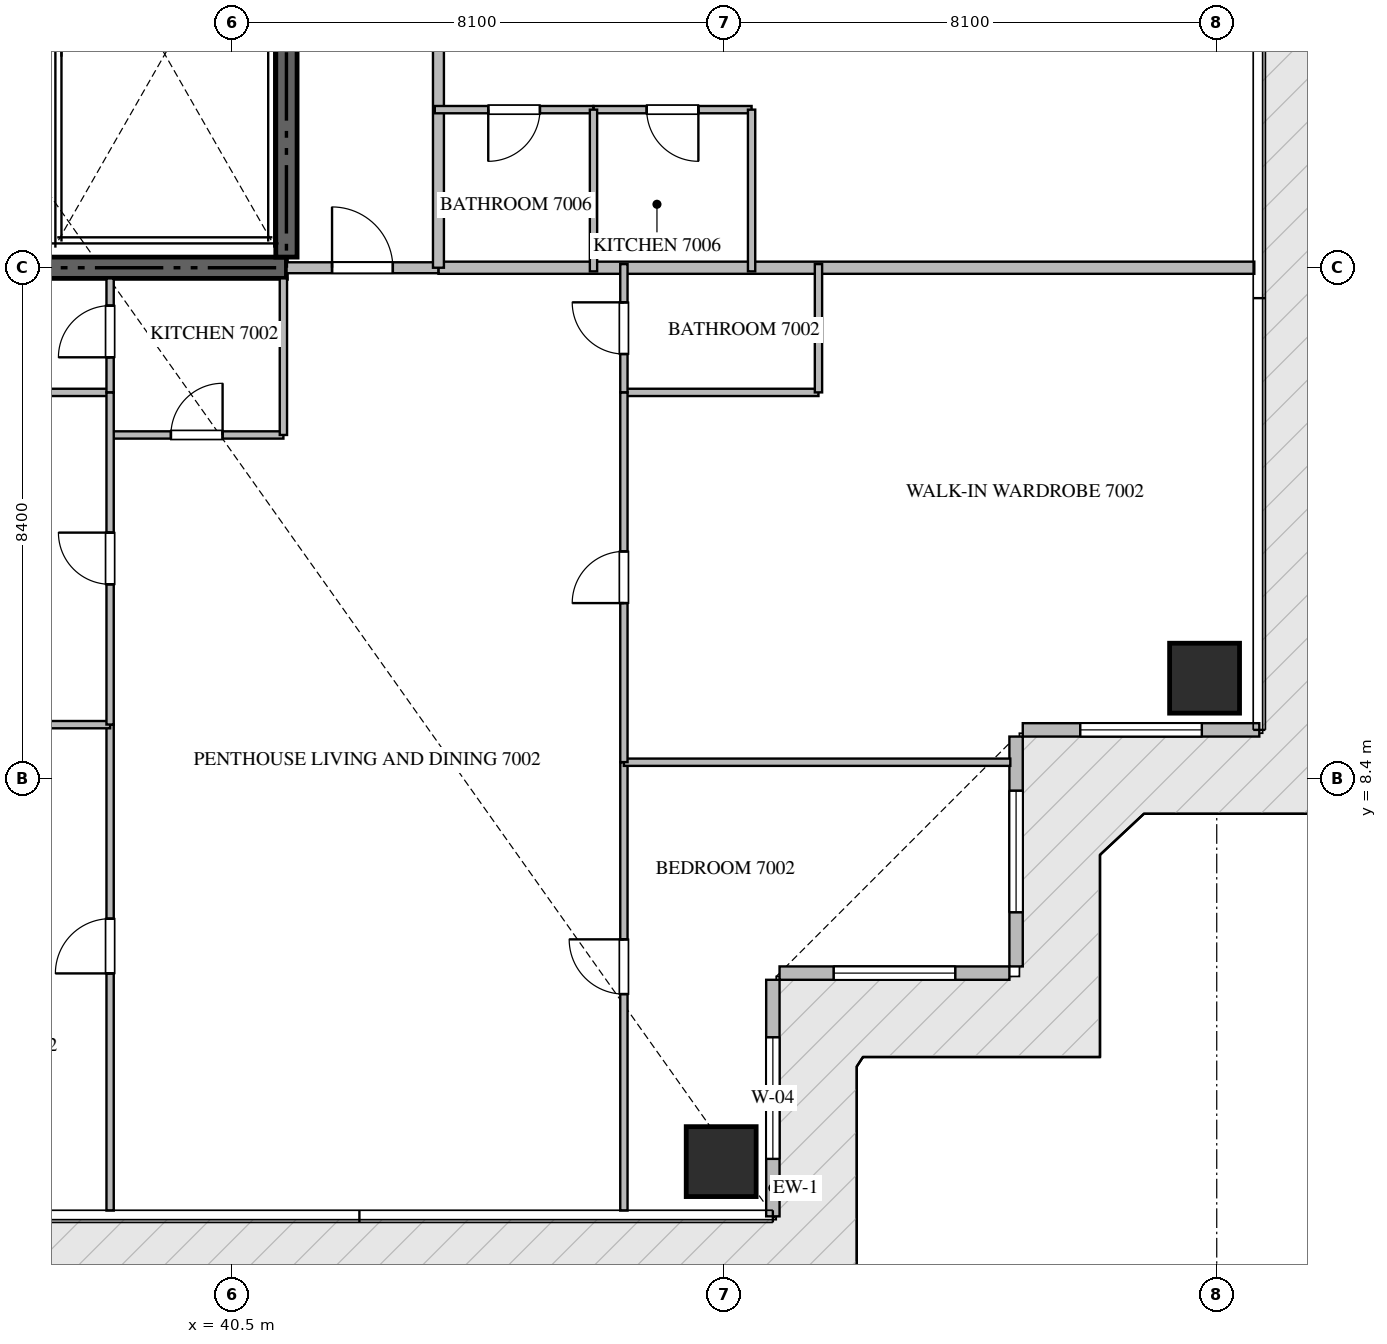
"""IFC4 building model, lengths in metres.
Left out: names, types, materials, properties, quantities, classifications, styles, units other than length and angle.
Written with IfcOpenShell. Run it as: python <this file> out.ifc"""

import sys

from ifc_helpers import new_model, si_unit, direction, frame, frame_2d, origin, origin_2d, place, context, subcontext, project, spatial, rectangle, extrude, source, transform, mapped, element, fill, save


model = new_model("IFC4")
c1 = context("Model", 3, precision=1e-05, world=origin(), true_north=direction((0.0, 1.0)))
c2 = subcontext(c1, "Body", "Model", "MODEL_VIEW")
j1 = project(units=[si_unit("LENGTHUNIT", "METRE"), si_unit("PLANEANGLEUNIT", "RADIAN")], contexts=[c1])
p1 = place(None, origin())
s1 = spatial("IfcSite", under=j1, at=p1, CompositionType="ELEMENT")
p2 = place(p1, origin())
s2 = spatial("IfcBuilding", under=s1, at=p2, CompositionType="ELEMENT")
p3 = place(p2, frame((0.0, 0.0, 279.75)))
s3 = spatial("IfcBuildingStorey", under=s2, at=p3, CompositionType="ELEMENT", Elevation=279.75)
p4 = place(p3, frame((23.4, 16.8, -0.26), z_axis=(0.0, 0.0, 1.0), x_axis=(1.0, 0.0, 0.0)))
e1 = element("IfcWall", 1, at=p4, inside=s3, PredefinedType="SHEAR", context=c2, shape_type="SweptSolid", body=[
    extrude(rectangle(XDim=18.0, YDim=0.35, at=frame_2d((9.0, 0.0))), origin(), (0.0, 0.0, 1.0), 3.848),
])
p5 = place(p3, frame((41.4, 16.975, -0.26), z_axis=(0.0, 0.0, 1.0), x_axis=(0.0, 1.0, 0.0)))
e2 = element("IfcWall", 2, at=p5, inside=s3, PredefinedType="SHEAR", context=c2, shape_type="SweptSolid", body=[
    extrude(rectangle(XDim=8.375, YDim=0.35, at=frame_2d((4.188, 0.0))), origin(), (0.0, 0.0, 1.0), 3.848),
])
m1 = source(origin(), c2, "Body", "SweptSolid", [
    extrude(rectangle(XDim=1.15, YDim=1.15, at=origin_2d()), origin(), (0.0, 0.0, 1.0), 3.85),
])
for number, where, z_axis, x_axis in (
    (3, (48.55, 2.1, -0.26), (0.0, 0.0, 1.0), (1.0, 0.0, 0.0)),
    (4, (56.5, 10.05, -0.26), (0.0, 0.0, 1.0), (1.0, 0.0, 0.0)),
):
    element("IfcColumn", number, at=place(p3, frame(where, z_axis=z_axis, x_axis=x_axis)), inside=s3, PredefinedType="COLUMN", context=c2, shape_type="MappedRepresentation", body=[
        mapped(m1, transform((0.0, 0.0, 0.0), scale=1.0)),
    ])
p6 = place(p3, frame((49.4, 1.2, 0.0), z_axis=(0.0, 0.0, 1.0), x_axis=(0.0, 1.0, 0.0)))
e5 = element("IfcWall", 5, at=p6, inside=s3, PredefinedType="ELEMENTEDWALL", context=c2, shape_type="SweptSolid", body=[
    extrude(rectangle(XDim=3.89, YDim=0.22, at=frame_2d((1.945, 0.0))), origin(), (0.0, 0.0, 1.0), 3.575),
])
p7 = place(p6, frame((0.945, 0.0, 0.65)))
e6 = element("IfcOpeningElement", 6, at=p7, cuts=e5, PredefinedType="OPENING", context=c2, shape_type="SweptSolid", body=[
    extrude(rectangle(XDim=2.0, YDim=2.2, at=frame_2d((1.0, 1.1))), frame((0.0, 0.12, 0.0), z_axis=(0.0, -1.0, 0.0), x_axis=(1.0, 0.0, 0.0)), (0.0, 0.0, 1.0), 0.24),
])
p8 = place(p3, frame((49.51, 5.2, 0.0), z_axis=(0.0, 0.0, 1.0), x_axis=(1.0, 0.0, 0.0)))
e7 = element("IfcWall", 7, at=p8, inside=s3, PredefinedType="ELEMENTEDWALL", context=c2, shape_type="SweptSolid", body=[
    extrude(rectangle(XDim=3.78, YDim=0.22, at=frame_2d((1.89, 0.0))), origin(), (0.0, 0.0, 1.0), 3.575),
])
p9 = place(p8, frame((0.89, 0.0, 0.65)))
e8 = element("IfcOpeningElement", 8, at=p9, cuts=e7, PredefinedType="OPENING", context=c2, shape_type="SweptSolid", body=[
    extrude(rectangle(XDim=2.0, YDim=2.2, at=frame_2d((1.0, 1.1))), frame((0.0, 0.12, 0.0), z_axis=(0.0, -1.0, 0.0), x_axis=(1.0, 0.0, 0.0)), (0.0, 0.0, 1.0), 0.24),
])
p10 = place(p3, frame((53.4, 5.31, 0.0), z_axis=(0.0, 0.0, 1.0), x_axis=(0.0, 1.0, 0.0)))
e9 = element("IfcWall", 9, at=p10, inside=s3, PredefinedType="ELEMENTEDWALL", context=c2, shape_type="SweptSolid", body=[
    extrude(rectangle(XDim=3.78, YDim=0.22, at=frame_2d((1.89, 0.0))), origin(), (0.0, 0.0, 1.0), 3.575),
])
p11 = place(p10, frame((0.89, 0.0, 0.65)))
e10 = element("IfcOpeningElement", 10, at=p11, cuts=e9, PredefinedType="OPENING", context=c2, shape_type="SweptSolid", body=[
    extrude(rectangle(XDim=2.0, YDim=2.2, at=frame_2d((1.0, 1.1))), frame((0.0, 0.12, 0.0), z_axis=(0.0, -1.0, 0.0), x_axis=(1.0, 0.0, 0.0)), (0.0, 0.0, 1.0), 0.24),
])
p12 = place(p3, frame((53.51, 9.2, 0.0), z_axis=(0.0, 0.0, 1.0), x_axis=(1.0, 0.0, 0.0)))
e11 = element("IfcWall", 11, at=p12, inside=s3, PredefinedType="ELEMENTEDWALL", context=c2, shape_type="SweptSolid", body=[
    extrude(rectangle(XDim=3.89, YDim=0.22, at=frame_2d((1.945, 0.0))), origin(), (0.0, 0.0, 1.0), 3.575),
])
p13 = place(p12, frame((0.945, 0.0, 0.65)))
e12 = element("IfcOpeningElement", 12, at=p13, cuts=e11, PredefinedType="OPENING", context=c2, shape_type="SweptSolid", body=[
    extrude(rectangle(XDim=2.0, YDim=2.2, at=frame_2d((1.0, 1.1))), frame((0.0, 0.12, 0.0), z_axis=(0.0, -1.0, 0.0), x_axis=(1.0, 0.0, 0.0)), (0.0, 0.0, 1.0), 0.24),
])
p14 = place(p3, frame((43.9, 16.8, 0.0), z_axis=(0.0, 0.0, 1.0), x_axis=(1.0, 0.0, 0.0)))
e13 = element("IfcWall", 13, at=p14, inside=s3, PredefinedType="PARTITIONING", context=c2, shape_type="SweptSolid", body=[
    extrude(rectangle(XDim=13.418, YDim=0.2, at=frame_2d((6.709, 0.0))), origin(), (0.0, 0.0, 1.0), 3.59),
])
p15 = place(p3, frame((41.402, 16.8, 0.0), z_axis=(0.0, 0.0, 1.0), x_axis=(1.0, 0.0, 0.0)))
e14 = element("IfcWall", 14, at=p15, inside=s3, PredefinedType="PARTITIONING", context=c2, shape_type="SweptSolid", body=[
    extrude(rectangle(XDim=2.496, YDim=0.18, at=frame_2d((1.248, 0.0))), origin(), (0.0, 0.0, 1.0), 3.59),
])
p16 = place(p15, frame((0.748, 0.0, 0.0)))
e15 = element("IfcOpeningElement", 15, at=p16, cuts=e14, PredefinedType="OPENING", context=c2, shape_type="SweptSolid", body=[
    extrude(rectangle(XDim=1.0, YDim=2.15, at=frame_2d((0.5, 1.075))), frame((0.0, 0.1, 0.0), z_axis=(0.0, -1.0, 0.0), x_axis=(1.0, 0.0, 0.0)), (0.0, 0.0, 1.0), 0.2),
])
p17 = place(p3, frame((43.9, 16.8, 0.0), z_axis=(0.0, 0.0, 1.0), x_axis=(0.0, 1.0, 0.0)))
e16 = element("IfcWall", 16, at=p17, inside=s3, PredefinedType="PARTITIONING", context=c2, shape_type="SweptSolid", body=[
    extrude(rectangle(XDim=16.8, YDim=0.18, at=frame_2d((8.4, 0.0))), origin(), (0.0, 0.0, 1.0), 3.59),
])
p18 = place(p17, frame((4.898, 0.0, 0.0)))
e17 = element("IfcOpeningElement", 17, at=p18, cuts=e16, PredefinedType="OPENING", context=c2, shape_type="SweptSolid", body=[
    extrude(rectangle(XDim=1.0, YDim=2.15, at=frame_2d((0.5, 1.075))), frame((0.0, 0.1, 0.0), z_axis=(0.0, -1.0, 0.0), x_axis=(1.0, 0.0, 0.0)), (0.0, 0.0, 1.0), 0.2),
])
p19 = place(p17, frame((13.335, 0.0, 0.0)))
e18 = element("IfcOpeningElement", 18, at=p19, cuts=e16, PredefinedType="OPENING", context=c2, shape_type="SweptSolid", body=[
    extrude(rectangle(XDim=1.0, YDim=2.15, at=frame_2d((0.5, 1.075))), frame((0.0, 0.1, 0.0), z_axis=(0.0, -1.0, 0.0), x_axis=(1.0, 0.0, 0.0)), (0.0, 0.0, 1.0), 0.2),
])
p20 = place(p3, frame((38.5, 14.05, 0.0), z_axis=(0.0, 0.0, 1.0), x_axis=(1.0, 0.0, 0.0)))
e19 = element("IfcWall", 19, at=p20, inside=s3, PredefinedType="PARTITIONING", context=c2, shape_type="SweptSolid", body=[
    extrude(rectangle(XDim=2.85, YDim=0.12, at=frame_2d((1.425, 0.0))), origin(), (0.0, 0.0, 1.0), 3.59),
])
p21 = place(p20, frame((1.0, 0.0, 0.0)))
e20 = element("IfcOpeningElement", 20, at=p21, cuts=e19, PredefinedType="OPENING", context=c2, shape_type="SweptSolid", body=[
    extrude(rectangle(XDim=0.85, YDim=2.1, at=frame_2d((0.425, 1.05))), frame((0.0, 0.07, 0.0), z_axis=(0.0, -1.0, 0.0), x_axis=(1.0, 0.0, 0.0)), (0.0, 0.0, 1.0), 0.14),
])
p22 = place(p3, frame((41.35, 14.05, 0.0), z_axis=(0.0, 0.0, 1.0), x_axis=(0.0, 1.0, 0.0)))
e21 = element("IfcWall", 21, at=p22, inside=s3, PredefinedType="PARTITIONING", context=c2, shape_type="SweptSolid", body=[
    extrude(rectangle(XDim=2.575, YDim=0.12, at=frame_2d((1.288, 0.0))), origin(), (0.0, 0.0, 1.0), 3.59),
])
p23 = place(p3, frame((38.5, 1.295, 0.0), z_axis=(0.0, 0.0, 1.0), x_axis=(0.0, 1.0, 0.0)))
e22 = element("IfcWall", 22, at=p23, inside=s3, PredefinedType="PARTITIONING", context=c2, shape_type="SweptSolid", body=[
    extrude(rectangle(XDim=7.991, YDim=0.12, at=frame_2d((3.996, 0.0))), origin(), (0.0, 0.0, 1.0), 3.59),
])
p24 = place(p23, frame((3.9, 0.0, 0.0)))
e23 = element("IfcOpeningElement", 23, at=p24, cuts=e22, PredefinedType="OPENING", context=c2, shape_type="SweptSolid", body=[
    extrude(rectangle(XDim=0.9, YDim=2.1, at=frame_2d((0.45, 1.05))), frame((0.0, 0.07, 0.0), z_axis=(0.0, -1.0, 0.0), x_axis=(1.0, 0.0, 0.0)), (0.0, 0.0, 1.0), 0.14),
])
p25 = place(p3, frame((33.14, 9.286, 0.0), z_axis=(0.0, 0.0, 1.0), x_axis=(1.0, 0.0, 0.0)))
e24 = element("IfcWall", 24, at=p25, inside=s3, PredefinedType="PARTITIONING", context=c2, shape_type="SweptSolid", body=[
    extrude(rectangle(XDim=5.36, YDim=0.12, at=frame_2d((2.68, 0.0))), origin(), (0.0, 0.0, 1.0), 3.59),
])
p26 = place(p3, frame((33.262, 14.75, 0.0), z_axis=(0.0, 0.0, 1.0), x_axis=(1.0, 0.0, 0.0)))
e25 = element("IfcWall", 25, at=p26, inside=s3, PredefinedType="PARTITIONING", context=c2, shape_type="SweptSolid", body=[
    extrude(rectangle(XDim=5.238, YDim=0.12, at=frame_2d((2.619, 0.0))), origin(), (0.0, 0.0, 1.0), 3.59),
])
p27 = place(p3, frame((38.5, 9.288, 0.0), z_axis=(0.0, 0.0, 1.0), x_axis=(0.0, 1.0, 0.0)))
e26 = element("IfcWall", 26, at=p27, inside=s3, PredefinedType="PARTITIONING", context=c2, shape_type="SweptSolid", body=[
    extrude(rectangle(XDim=5.462, YDim=0.12, at=frame_2d((2.731, 0.0))), origin(), (0.0, 0.0, 1.0), 3.59),
])
p28 = place(p27, frame((2.306, 0.0, 0.0)))
e27 = element("IfcOpeningElement", 27, at=p28, cuts=e26, PredefinedType="OPENING", context=c2, shape_type="SweptSolid", body=[
    extrude(rectangle(XDim=0.85, YDim=2.1, at=frame_2d((0.425, 1.05))), frame((0.0, 0.07, 0.0), z_axis=(0.0, -1.0, 0.0), x_axis=(1.0, 0.0, 0.0)), (0.0, 0.0, 1.0), 0.14),
])
p29 = place(p3, frame((38.5, 14.752, 0.0), z_axis=(0.0, 0.0, 1.0), x_axis=(0.0, 1.0, 0.0)))
e28 = element("IfcWall", 28, at=p29, inside=s3, PredefinedType="PARTITIONING", context=c2, shape_type="SweptSolid", body=[
    extrude(rectangle(XDim=1.873, YDim=0.12, at=frame_2d((0.937, 0.0))), origin(), (0.0, 0.0, 1.0), 3.59),
])
p30 = place(p29, frame((0.575, 0.0, 0.0)))
e29 = element("IfcOpeningElement", 29, at=p30, cuts=e28, PredefinedType="OPENING", context=c2, shape_type="SweptSolid", body=[
    extrude(rectangle(XDim=0.85, YDim=2.1, at=frame_2d((0.425, 1.05))), frame((0.0, 0.07, 0.0), z_axis=(0.0, -1.0, 0.0), x_axis=(1.0, 0.0, 0.0)), (0.0, 0.0, 1.0), 0.14),
])
p31 = place(p3, frame((46.95, 1.295, 0.0), z_axis=(0.0, 0.0, 1.0), x_axis=(0.0, 1.0, 0.0)))
e30 = element("IfcWall", 30, at=p31, inside=s3, PredefinedType="PARTITIONING", context=c2, shape_type="SweptSolid", body=[
    extrude(rectangle(XDim=7.373, YDim=0.12, at=frame_2d((3.687, 0.0))), origin(), (0.0, 0.0, 1.0), 3.59),
])
p32 = place(p31, frame((3.56, 0.0, 0.0)))
e31 = element("IfcOpeningElement", 31, at=p32, cuts=e30, PredefinedType="OPENING", context=c2, shape_type="SweptSolid", body=[
    extrude(rectangle(XDim=0.9, YDim=2.1, at=frame_2d((0.45, 1.05))), frame((0.0, 0.07, 0.0), z_axis=(0.0, -1.0, 0.0), x_axis=(1.0, 0.0, 0.0)), (0.0, 0.0, 1.0), 0.14),
])
p33 = place(p3, frame((46.95, 8.668, 0.0), z_axis=(0.0, 0.0, 1.0), x_axis=(1.0, 0.0, 0.0)))
e32 = element("IfcWall", 32, at=p33, inside=s3, PredefinedType="PARTITIONING", context=c2, shape_type="SweptSolid", body=[
    extrude(rectangle(XDim=6.355, YDim=0.12, at=frame_2d((3.177, 0.0))), origin(), (0.0, 0.0, 1.0), 3.59),
])
p34 = place(p3, frame((46.95, 14.75, 0.0), z_axis=(0.0, 0.0, 1.0), x_axis=(1.0, 0.0, 0.0)))
e33 = element("IfcWall", 33, at=p34, inside=s3, PredefinedType="PARTITIONING", context=c2, shape_type="SweptSolid", body=[
    extrude(rectangle(XDim=3.2, YDim=0.12, at=frame_2d((1.6, 0.0))), origin(), (0.0, 0.0, 1.0), 3.59),
])
p35 = place(p3, frame((50.15, 14.75, 0.0), z_axis=(0.0, 0.0, 1.0), x_axis=(0.0, 1.0, 0.0)))
e34 = element("IfcWall", 34, at=p35, inside=s3, PredefinedType="PARTITIONING", context=c2, shape_type="SweptSolid", body=[
    extrude(rectangle(XDim=2.11, YDim=0.12, at=frame_2d((1.055, 0.0))), origin(), (0.0, 0.0, 1.0), 3.59),
])
p36 = place(p3, frame((46.95, 8.67, 0.0), z_axis=(0.0, 0.0, 1.0), x_axis=(0.0, 1.0, 0.0)))
e35 = element("IfcWall", 35, at=p36, inside=s3, PredefinedType="PARTITIONING", context=c2, shape_type="SweptSolid", body=[
    extrude(rectangle(XDim=6.08, YDim=0.12, at=frame_2d((3.04, 0.0))), origin(), (0.0, 0.0, 1.0), 3.59),
])
p37 = place(p36, frame((2.615, 0.0, 0.0)))
e36 = element("IfcOpeningElement", 36, at=p37, cuts=e35, PredefinedType="OPENING", context=c2, shape_type="SweptSolid", body=[
    extrude(rectangle(XDim=0.85, YDim=2.1, at=frame_2d((0.425, 1.05))), frame((0.0, 0.07, 0.0), z_axis=(0.0, -1.0, 0.0), x_axis=(1.0, 0.0, 0.0)), (0.0, 0.0, 1.0), 0.14),
])
p38 = place(p3, frame((46.95, 14.752, 0.0), z_axis=(0.0, 0.0, 1.0), x_axis=(0.0, 1.0, 0.0)))
e37 = element("IfcWall", 37, at=p38, inside=s3, PredefinedType="PARTITIONING", context=c2, shape_type="SweptSolid", body=[
    extrude(rectangle(XDim=2.108, YDim=0.12, at=frame_2d((1.054, 0.0))), origin(), (0.0, 0.0, 1.0), 3.59),
])
p39 = place(p38, frame((0.629, 0.0, 0.0)))
e38 = element("IfcOpeningElement", 38, at=p39, cuts=e37, PredefinedType="OPENING", context=c2, shape_type="SweptSolid", body=[
    extrude(rectangle(XDim=0.85, YDim=2.1, at=frame_2d((0.425, 1.05))), frame((0.0, 0.07, 0.0), z_axis=(0.0, -1.0, 0.0), x_axis=(1.0, 0.0, 0.0)), (0.0, 0.0, 1.0), 0.14),
])
p40 = place(p3, frame((49.05, 19.4, 0.0), z_axis=(0.0, 0.0, 1.0), x_axis=(-1.0, 0.0, 0.0)))
e39 = element("IfcWall", 39, at=p40, inside=s3, PredefinedType="PARTITIONING", context=c2, shape_type="SweptSolid", body=[
    extrude(rectangle(XDim=2.6, YDim=0.12, at=frame_2d((1.3, 0.0))), origin(), (0.0, 0.0, 1.0), 3.59),
])
p41 = place(p40, frame((0.875, 0.0, 0.0)))
e40 = element("IfcOpeningElement", 40, at=p41, cuts=e39, PredefinedType="OPENING", context=c2, shape_type="SweptSolid", body=[
    extrude(rectangle(XDim=0.85, YDim=2.1, at=frame_2d((0.425, 1.05))), frame((0.0, 0.07, 0.0), z_axis=(0.0, -1.0, 0.0), x_axis=(1.0, 0.0, 0.0)), (0.0, 0.0, 1.0), 0.14),
])
p42 = place(p3, frame((46.448, 19.4, 0.0), z_axis=(0.0, 0.0, 1.0), x_axis=(-1.0, 0.0, 0.0)))
e41 = element("IfcWall", 41, at=p42, inside=s3, PredefinedType="PARTITIONING", context=c2, shape_type="SweptSolid", body=[
    extrude(rectangle(XDim=2.608, YDim=0.12, at=frame_2d((1.304, 0.0))), origin(), (0.0, 0.0, 1.0), 3.59),
])
p43 = place(p42, frame((0.879, 0.0, 0.0)))
e42 = element("IfcOpeningElement", 42, at=p43, cuts=e41, PredefinedType="OPENING", context=c2, shape_type="SweptSolid", body=[
    extrude(rectangle(XDim=0.85, YDim=2.1, at=frame_2d((0.425, 1.05))), frame((0.0, 0.07, 0.0), z_axis=(0.0, -1.0, 0.0), x_axis=(1.0, 0.0, 0.0)), (0.0, 0.0, 1.0), 0.14),
])
for number, where, z_axis, x_axis in (
    (43, (46.45, 16.74, 0.0), (0.0, 0.0, 1.0), (0.0, 1.0, 0.0)),
    (44, (49.05, 16.74, 0.0), (0.0, 0.0, 1.0), (0.0, 1.0, 0.0)),
):
    element("IfcWall", number, at=place(p3, frame(where, z_axis=z_axis, x_axis=x_axis)), inside=s3, PredefinedType="PARTITIONING", context=c2, shape_type="SweptSolid", body=[
        extrude(rectangle(XDim=2.66, YDim=0.12, at=frame_2d((1.33, 0.0))), origin(), (0.0, 0.0, 1.0), 3.59),
    ])
m2 = source(origin(), c2, "Body", "SweptSolid", [
    extrude(rectangle(XDim=2.0, YDim=2.2, at=frame_2d((1.0, 1.1))), frame((0.0, 0.03, 0.0), z_axis=(0.0, -1.0, 0.0), x_axis=(1.0, 0.0, 0.0)), (0.0, 0.0, 1.0), 0.06),
])
p44 = place(p7, origin())
e45 = element("IfcWindow", 45, at=p44, inside=s3, PartitioningType="SINGLE_PANEL", PredefinedType="WINDOW", context=c2, shape_type="MappedRepresentation", body=[
    mapped(m2, transform((0.0, 0.0, 0.0), scale=1.0)),
])
fill(e6, e45)
p45 = place(p9, origin())
e46 = element("IfcWindow", 46, at=p45, inside=s3, PartitioningType="SINGLE_PANEL", PredefinedType="WINDOW", context=c2, shape_type="MappedRepresentation", body=[
    mapped(m2, transform((0.0, 0.0, 0.0), scale=1.0)),
])
fill(e8, e46)
p46 = place(p11, origin())
e47 = element("IfcWindow", 47, at=p46, inside=s3, PartitioningType="SINGLE_PANEL", PredefinedType="WINDOW", context=c2, shape_type="MappedRepresentation", body=[
    mapped(m2, transform((0.0, 0.0, 0.0), scale=1.0)),
])
fill(e10, e47)
p47 = place(p13, origin())
e48 = element("IfcWindow", 48, at=p47, inside=s3, PartitioningType="SINGLE_PANEL", PredefinedType="WINDOW", context=c2, shape_type="MappedRepresentation", body=[
    mapped(m2, transform((0.0, 0.0, 0.0), scale=1.0)),
])
fill(e12, e48)
m3 = source(origin(), c2, "Body", "SweptSolid", [
    extrude(rectangle(XDim=1.0, YDim=2.15, at=frame_2d((0.5, 1.075))), frame((0.0, 0.025, 0.0), z_axis=(0.0, -1.0, 0.0), x_axis=(1.0, 0.0, 0.0)), (0.0, 0.0, 1.0), 0.05),
])
p48 = place(p16, origin())
e49 = element("IfcDoor", 49, at=p48, inside=s3, OperationType="SINGLE_SWING_LEFT", PredefinedType="DOOR", context=c2, shape_type="MappedRepresentation", body=[
    mapped(m3, transform((0.0, 0.0, 0.0), scale=1.0)),
])
fill(e15, e49)
m4 = source(origin(), c2, "Body", "SweptSolid", [
    extrude(rectangle(XDim=0.85, YDim=2.1, at=frame_2d((0.425, 1.05))), frame((0.0, 0.025, 0.0), z_axis=(0.0, -1.0, 0.0), x_axis=(1.0, 0.0, 0.0)), (0.0, 0.0, 1.0), 0.05),
])
p49 = place(p21, origin())
e50 = element("IfcDoor", 50, at=p49, inside=s3, OperationType="SINGLE_SWING_RIGHT", PredefinedType="DOOR", context=c2, shape_type="MappedRepresentation", body=[
    mapped(m4, transform((0.0, 0.0, 0.0), scale=1.0)),
])
fill(e20, e50)
m5 = source(origin(), c2, "Body", "SweptSolid", [
    extrude(rectangle(XDim=0.9, YDim=2.1, at=frame_2d((0.45, 1.05))), frame((0.0, 0.025, 0.0), z_axis=(0.0, -1.0, 0.0), x_axis=(1.0, 0.0, 0.0)), (0.0, 0.0, 1.0), 0.05),
])
p50 = place(p24, origin())
e51 = element("IfcDoor", 51, at=p50, inside=s3, OperationType="SINGLE_SWING_LEFT", PredefinedType="DOOR", context=c2, shape_type="MappedRepresentation", body=[
    mapped(m5, transform((0.0, 0.0, 0.0), scale=1.0)),
])
fill(e23, e51)
p51 = place(p28, origin())
e52 = element("IfcDoor", 52, at=p51, inside=s3, OperationType="SINGLE_SWING_RIGHT", PredefinedType="DOOR", context=c2, shape_type="MappedRepresentation", body=[
    mapped(m4, transform((0.0, 0.0, 0.0), scale=1.0)),
])
fill(e27, e52)
p52 = place(p30, origin())
e53 = element("IfcDoor", 53, at=p52, inside=s3, OperationType="SINGLE_SWING_LEFT", PredefinedType="DOOR", context=c2, shape_type="MappedRepresentation", body=[
    mapped(m4, transform((0.0, 0.0, 0.0), scale=1.0)),
])
fill(e29, e53)
p53 = place(p32, origin())
e54 = element("IfcDoor", 54, at=p53, inside=s3, OperationType="SINGLE_SWING_RIGHT", PredefinedType="DOOR", context=c2, shape_type="MappedRepresentation", body=[
    mapped(m5, transform((0.0, 0.0, 0.0), scale=1.0)),
])
fill(e31, e54)
p54 = place(p37, origin())
e55 = element("IfcDoor", 55, at=p54, inside=s3, OperationType="SINGLE_SWING_LEFT", PredefinedType="DOOR", context=c2, shape_type="MappedRepresentation", body=[
    mapped(m4, transform((0.0, 0.0, 0.0), scale=1.0)),
])
fill(e36, e55)
p55 = place(p39, origin())
e56 = element("IfcDoor", 56, at=p55, inside=s3, OperationType="SINGLE_SWING_RIGHT", PredefinedType="DOOR", context=c2, shape_type="MappedRepresentation", body=[
    mapped(m4, transform((0.0, 0.0, 0.0), scale=1.0)),
])
fill(e38, e56)
p56 = place(p41, origin())
e57 = element("IfcDoor", 57, at=p56, inside=s3, OperationType="SINGLE_SWING_LEFT", PredefinedType="DOOR", context=c2, shape_type="MappedRepresentation", body=[
    mapped(m4, transform((0.0, 0.0, 0.0), scale=1.0)),
])
fill(e40, e57)
p57 = place(p43, origin())
e58 = element("IfcDoor", 58, at=p57, inside=s3, OperationType="SINGLE_SWING_RIGHT", PredefinedType="DOOR", context=c2, shape_type="MappedRepresentation", body=[
    mapped(m4, transform((0.0, 0.0, 0.0), scale=1.0)),
])
fill(e42, e58)
save(model, sys.argv[1])
